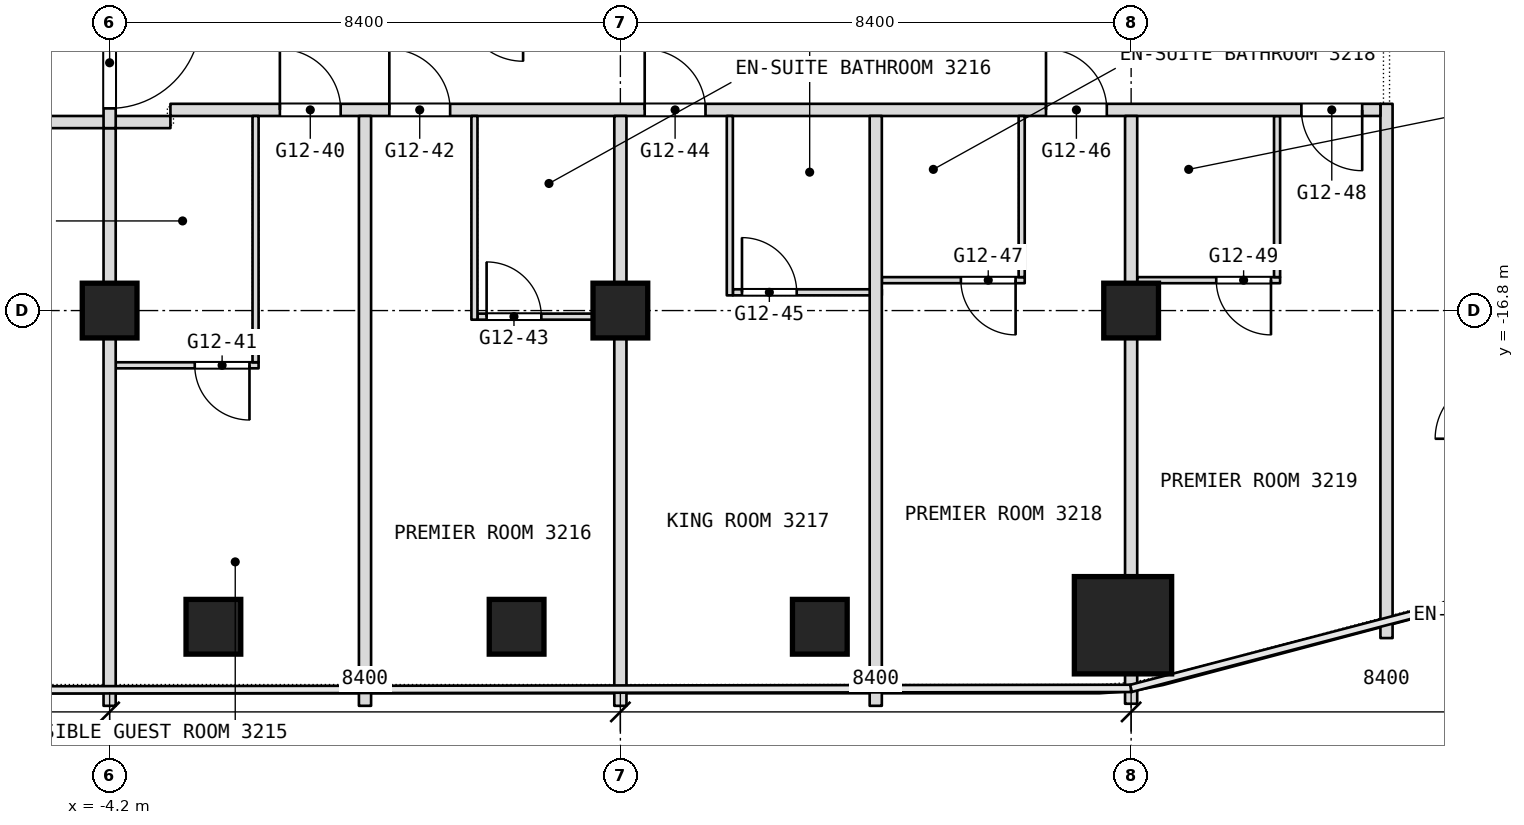
"""IFC4 building model, lengths in metres.
Left out: names, types, materials, properties, quantities, classifications, styles, units other than length and angle.
Written with IfcOpenShell. Run it as: python <this file> out.ifc"""

import sys

from ifc_helpers import new_model, si_unit, direction, frame, frame_2d, origin, origin_2d, place, context, subcontext, project, spatial, rectangle, extrude, element, fill, save


model = new_model("IFC4")
c1 = context("Model", 3, precision=1e-05, world=origin(), true_north=direction((0.0, 1.0)))
c2 = subcontext(c1, "Body", "Model", "MODEL_VIEW")
j1 = project(units=[si_unit("LENGTHUNIT", "METRE"), si_unit("PLANEANGLEUNIT", "RADIAN")], contexts=[c1])
p1 = place(None, origin())
s1 = spatial("IfcSite", under=j1, at=p1, CompositionType="ELEMENT")
p2 = place(p1, origin())
s2 = spatial("IfcBuilding", under=s1, at=p2, CompositionType="ELEMENT")
p3 = place(p2, frame((0.0, 0.0, 140.9)))
s3 = spatial("IfcBuildingStorey", under=s2, at=p3, CompositionType="ELEMENT", Elevation=140.9)
p4 = place(p3, frame((12.466, -21.975, 0.0), z_axis=(0.0, 0.0, 1.0), x_axis=(1.0, 0.0, 0.0)))
e1 = element("IfcColumn", 1, at=p4, inside=s3, PredefinedType="COLUMN", context=c2, shape_type="SweptSolid", body=[
    extrude(rectangle(XDim=1.6, YDim=1.6, at=origin_2d()), origin(), (0.0, 0.0, 1.0), 3.6),
])
for number, where, z_axis, x_axis in (
    (2, (-4.2, -16.8, 0.0), (0.0, 0.0, 1.0), (1.0, 0.0, 0.0)),
    (3, (4.2, -16.8, 0.0), (0.0, 0.0, 1.0), (1.0, 0.0, 0.0)),
    (4, (12.6, -16.8, 0.0), (0.0, 0.0, 1.0), (1.0, 0.0, 0.0)),
    (5, (7.48, -22.0, 0.0), (0.0, 0.0, 1.0), (1.0, 0.0, 0.0)),
    (6, (2.493, -22.0, 0.0), (0.0, 0.0, 1.0), (1.0, 0.0, 0.0)),
    (7, (-2.493, -22.0, 0.0), (0.0, 0.0, 1.0), (1.0, 0.0, 0.0)),
):
    element("IfcColumn", number, at=place(p3, frame(where, z_axis=z_axis, x_axis=x_axis)), inside=s3, PredefinedType="COLUMN", context=c2, shape_type="SweptSolid", body=[
        extrude(rectangle(XDim=0.9, YDim=0.9, at=origin_2d()), origin(), (0.0, 0.0, 1.0), 3.6),
    ])
p5 = place(p3, frame((-4.1, -17.7, 0.0), z_axis=(0.0, 0.0, 1.0), x_axis=(1.0, 0.0, 0.0)))
e8 = element("IfcWall", 8, at=p5, inside=s3, PredefinedType="PARTITIONING", context=c2, shape_type="SweptSolid", body=[
    extrude(rectangle(XDim=2.35, YDim=0.1, at=frame_2d((1.175, 0.0))), origin(), (0.0, 0.0, 1.0), 3.34),
])
p6 = place(p5, frame((1.3, 0.0, 0.0)))
e9 = element("IfcOpeningElement", 9, at=p6, cuts=e8, PredefinedType="OPENING", context=c2, shape_type="SweptSolid", body=[
    extrude(rectangle(XDim=0.9, YDim=2.1, at=frame_2d((0.45, 1.05))), frame((0.0, 0.05, 0.0), z_axis=(0.0, -1.0, 0.0), x_axis=(1.0, 0.0, 0.0)), (0.0, 0.0, 1.0), 0.1),
])
p7 = place(p3, frame((1.85, -16.9, 0.0), z_axis=(0.0, 0.0, 1.0), x_axis=(1.0, 0.0, 0.0)))
e10 = element("IfcWall", 10, at=p7, inside=s3, PredefinedType="PARTITIONING", context=c2, shape_type="SweptSolid", body=[
    extrude(rectangle(XDim=2.45, YDim=0.1, at=frame_2d((1.225, 0.0))), origin(), (0.0, 0.0, 1.0), 2.89),
])
p8 = place(p7, frame((0.15, 0.0, 0.0)))
e11 = element("IfcOpeningElement", 11, at=p8, cuts=e10, PredefinedType="OPENING", context=c2, shape_type="SweptSolid", body=[
    extrude(rectangle(XDim=0.9, YDim=2.1, at=frame_2d((0.45, 1.05))), frame((0.0, 0.05, 0.0), z_axis=(0.0, -1.0, 0.0), x_axis=(1.0, 0.0, 0.0)), (0.0, 0.0, 1.0), 0.1),
])
p9 = place(p3, frame((16.8, -22.186, 0.0), z_axis=(0.0, 0.0, 1.0), x_axis=(0.0, 1.0, 0.0)))
e12 = element("IfcWall", 12, at=p9, inside=s3, PredefinedType="PARTITIONING", context=c2, shape_type="SweptSolid", body=[
    extrude(rectangle(XDim=8.786, YDim=0.2, at=frame_2d((4.393, 0.0))), origin(), (0.0, 0.0, 1.0), 3.34),
])
p10 = place(p3, frame((6.05, -16.5, 0.0), z_axis=(0.0, 0.0, 1.0), x_axis=(1.0, 0.0, 0.0)))
e13 = element("IfcWall", 13, at=p10, inside=s3, PredefinedType="PARTITIONING", context=c2, shape_type="SweptSolid", body=[
    extrude(rectangle(XDim=2.45, YDim=0.1, at=frame_2d((1.225, 0.0))), origin(), (0.0, 0.0, 1.0), 3.34),
])
p11 = place(p10, frame((0.15, 0.0, 0.0)))
e14 = element("IfcOpeningElement", 14, at=p11, cuts=e13, PredefinedType="OPENING", context=c2, shape_type="SweptSolid", body=[
    extrude(rectangle(XDim=0.9, YDim=2.1, at=frame_2d((0.45, 1.05))), frame((0.0, 0.05, 0.0), z_axis=(0.0, -1.0, 0.0), x_axis=(1.0, 0.0, 0.0)), (0.0, 0.0, 1.0), 0.1),
])
p12 = place(p3, frame((8.5, -16.3, 0.0), z_axis=(0.0, 0.0, 1.0), x_axis=(1.0, 0.0, 0.0)))
e15 = element("IfcWall", 15, at=p12, inside=s3, PredefinedType="PARTITIONING", context=c2, shape_type="SweptSolid", body=[
    extrude(rectangle(XDim=2.35, YDim=0.1, at=frame_2d((1.175, 0.0))), origin(), (0.0, 0.0, 1.0), 3.34),
])
p13 = place(p12, frame((1.3, 0.0, 0.0)))
e16 = element("IfcOpeningElement", 16, at=p13, cuts=e15, PredefinedType="OPENING", context=c2, shape_type="SweptSolid", body=[
    extrude(rectangle(XDim=0.9, YDim=2.1, at=frame_2d((0.45, 1.05))), frame((0.0, 0.05, 0.0), z_axis=(0.0, -1.0, 0.0), x_axis=(1.0, 0.0, 0.0)), (0.0, 0.0, 1.0), 0.1),
])
p14 = place(p3, frame((12.7, -16.3, 0.0), z_axis=(0.0, 0.0, 1.0), x_axis=(1.0, 0.0, 0.0)))
e17 = element("IfcWall", 17, at=p14, inside=s3, PredefinedType="PARTITIONING", context=c2, shape_type="SweptSolid", body=[
    extrude(rectangle(XDim=2.35, YDim=0.1, at=frame_2d((1.175, 0.0))), origin(), (0.0, 0.0, 1.0), 3.34),
])
p15 = place(p14, frame((1.3, 0.0, 0.0)))
e18 = element("IfcOpeningElement", 18, at=p15, cuts=e17, PredefinedType="OPENING", context=c2, shape_type="SweptSolid", body=[
    extrude(rectangle(XDim=0.9, YDim=2.1, at=frame_2d((0.45, 1.05))), frame((0.0, 0.05, 0.0), z_axis=(0.0, -1.0, 0.0), x_axis=(1.0, 0.0, 0.0)), (0.0, 0.0, 1.0), 0.1),
])
p16 = place(p3, frame((15.0, -16.25, 0.0), z_axis=(0.0, 0.0, 1.0), x_axis=(0.0, 1.0, 0.0)))
e19 = element("IfcWall", 19, at=p16, inside=s3, PredefinedType="PARTITIONING", context=c2, shape_type="SweptSolid", body=[
    extrude(rectangle(XDim=2.65, YDim=0.1, at=frame_2d((1.325, 0.0))), origin(), (0.0, 0.0, 1.0), 3.34),
])
p17 = place(p3, frame((-12.4, -13.7, 0.0), z_axis=(0.0, 0.0, 1.0), x_axis=(1.0, 0.0, 0.0)))
e20 = element("IfcWall", 20, at=p17, inside=s3, PredefinedType="PARTITIONING", context=c2, shape_type="SweptSolid", body=[
    extrude(rectangle(XDim=9.2, YDim=0.2, at=frame_2d((4.6, 0.0))), origin(), (0.0, 0.0, 1.0), 3.34),
])
p18 = place(p17, frame((3.1, 0.0, 0.0)))
e21 = element("IfcOpeningElement", 21, at=p18, cuts=e20, PredefinedType="OPENING", context=c2, shape_type="SweptSolid", body=[
    extrude(rectangle(XDim=1.8, YDim=2.1, at=frame_2d((0.9, 1.05))), frame((0.0, 0.1, 0.0), z_axis=(0.0, -1.0, 0.0), x_axis=(1.0, 0.0, 0.0)), (0.0, 0.0, 1.0), 0.2),
])
p19 = place(p3, frame((-3.2, -13.5, 0.0), z_axis=(0.0, 0.0, 1.0), x_axis=(1.0, 0.0, 0.0)))
e22 = element("IfcWall", 22, at=p19, inside=s3, PredefinedType="PARTITIONING", context=c2, shape_type="SweptSolid", body=[
    extrude(rectangle(XDim=19.9, YDim=0.2, at=frame_2d((9.95, 0.0))), origin(), (0.0, 0.0, 1.0), 3.34),
])
p20 = place(p19, frame((1.8, 0.0, 0.0)))
e23 = element("IfcOpeningElement", 23, at=p20, cuts=e22, PredefinedType="OPENING", context=c2, shape_type="SweptSolid", body=[
    extrude(rectangle(XDim=1.0, YDim=2.1, at=frame_2d((0.5, 1.05))), frame((0.0, 0.1, 0.0), z_axis=(0.0, -1.0, 0.0), x_axis=(1.0, 0.0, 0.0)), (0.0, 0.0, 1.0), 0.2),
])
p21 = place(p19, frame((3.6, 0.0, 0.0)))
e24 = element("IfcOpeningElement", 24, at=p21, cuts=e22, PredefinedType="OPENING", context=c2, shape_type="SweptSolid", body=[
    extrude(rectangle(XDim=1.0, YDim=2.1, at=frame_2d((0.5, 1.05))), frame((0.0, 0.1, 0.0), z_axis=(0.0, -1.0, 0.0), x_axis=(1.0, 0.0, 0.0)), (0.0, 0.0, 1.0), 0.2),
])
p22 = place(p19, frame((7.8, 0.0, 0.0)))
e25 = element("IfcOpeningElement", 25, at=p22, cuts=e22, PredefinedType="OPENING", context=c2, shape_type="SweptSolid", body=[
    extrude(rectangle(XDim=1.0, YDim=2.1, at=frame_2d((0.5, 1.05))), frame((0.0, 0.1, 0.0), z_axis=(0.0, -1.0, 0.0), x_axis=(1.0, 0.0, 0.0)), (0.0, 0.0, 1.0), 0.2),
])
p23 = place(p19, frame((14.4, 0.0, 0.0)))
e26 = element("IfcOpeningElement", 26, at=p23, cuts=e22, PredefinedType="OPENING", context=c2, shape_type="SweptSolid", body=[
    extrude(rectangle(XDim=1.0, YDim=2.1, at=frame_2d((0.5, 1.05))), frame((0.0, 0.1, 0.0), z_axis=(0.0, -1.0, 0.0), x_axis=(1.0, 0.0, 0.0)), (0.0, 0.0, 1.0), 0.2),
])
p24 = place(p19, frame((18.6, 0.0, 0.0)))
e27 = element("IfcOpeningElement", 27, at=p24, cuts=e22, PredefinedType="OPENING", context=c2, shape_type="SweptSolid", body=[
    extrude(rectangle(XDim=1.0, YDim=2.1, at=frame_2d((0.5, 1.05))), frame((0.0, 0.1, 0.0), z_axis=(0.0, -1.0, 0.0), x_axis=(1.0, 0.0, 0.0)), (0.0, 0.0, 1.0), 0.2),
])
p25 = place(p3, frame((12.6, -23.266, 0.0), z_axis=(0.0, 0.0, 1.0), x_axis=(0.0, 1.0, 0.0)))
e28 = element("IfcWall", 28, at=p25, inside=s3, PredefinedType="PARTITIONING", context=c2, shape_type="SweptSolid", body=[
    extrude(rectangle(XDim=0.491, YDim=0.2, at=frame_2d((0.246, 0.0))), origin(), (0.0, 0.0, 1.0), 3.34),
])
p26 = place(p3, frame((12.6, -21.175, 0.0), z_axis=(0.0, 0.0, 1.0), x_axis=(0.0, 1.0, 0.0)))
e29 = element("IfcWall", 29, at=p26, inside=s3, PredefinedType="PARTITIONING", context=c2, shape_type="SweptSolid", body=[
    extrude(rectangle(XDim=7.575, YDim=0.2, at=frame_2d((3.788, 0.0))), origin(), (0.0, 0.0, 1.0), 3.34),
])
p27 = place(p3, frame((10.8, -16.25, 0.0), z_axis=(0.0, 0.0, 1.0), x_axis=(0.0, 1.0, 0.0)))
e30 = element("IfcWall", 30, at=p27, inside=s3, PredefinedType="PARTITIONING", context=c2, shape_type="SweptSolid", body=[
    extrude(rectangle(XDim=2.65, YDim=0.1, at=frame_2d((1.325, 0.0))), origin(), (0.0, 0.0, 1.0), 3.34),
])
p28 = place(p3, frame((8.4, -23.3, 0.0), z_axis=(0.0, 0.0, 1.0), x_axis=(0.0, 1.0, 0.0)))
e31 = element("IfcWall", 31, at=p28, inside=s3, PredefinedType="PARTITIONING", context=c2, shape_type="SweptSolid", body=[
    extrude(rectangle(XDim=9.7, YDim=0.2, at=frame_2d((4.85, 0.0))), origin(), (0.0, 0.0, 1.0), 3.34),
])
p29 = place(p3, frame((6.0, -16.55, 0.0), z_axis=(0.0, 0.0, 1.0), x_axis=(0.0, 1.0, 0.0)))
e32 = element("IfcWall", 32, at=p29, inside=s3, PredefinedType="PARTITIONING", context=c2, shape_type="SweptSolid", body=[
    extrude(rectangle(XDim=2.95, YDim=0.1, at=frame_2d((1.475, 0.0))), origin(), (0.0, 0.0, 1.0), 3.34),
])
p30 = place(p3, frame((4.2, -23.3, 0.0), z_axis=(0.0, 0.0, 1.0), x_axis=(0.0, 1.0, 0.0)))
e33 = element("IfcWall", 33, at=p30, inside=s3, PredefinedType="PARTITIONING", context=c2, shape_type="SweptSolid", body=[
    extrude(rectangle(XDim=9.7, YDim=0.2, at=frame_2d((4.85, 0.0))), origin(), (0.0, 0.0, 1.0), 3.34),
])
p31 = place(p3, frame((1.8, -16.95, 0.0), z_axis=(0.0, 0.0, 1.0), x_axis=(0.0, 1.0, 0.0)))
e34 = element("IfcWall", 34, at=p31, inside=s3, PredefinedType="PARTITIONING", context=c2, shape_type="SweptSolid", body=[
    extrude(rectangle(XDim=3.35, YDim=0.1, at=frame_2d((1.675, 0.0))), origin(), (0.0, 0.0, 1.0), 3.34),
])
p32 = place(p3, frame((0.0, -23.3, 0.0), z_axis=(0.0, 0.0, 1.0), x_axis=(0.0, 1.0, 0.0)))
e35 = element("IfcWall", 35, at=p32, inside=s3, PredefinedType="PARTITIONING", context=c2, shape_type="SweptSolid", body=[
    extrude(rectangle(XDim=9.7, YDim=0.2, at=frame_2d((4.85, 0.0))), origin(), (0.0, 0.0, 1.0), 3.34),
])
p33 = place(p3, frame((-1.8, -17.65, 0.0), z_axis=(0.0, 0.0, 1.0), x_axis=(0.0, 1.0, 0.0)))
e36 = element("IfcWall", 36, at=p33, inside=s3, PredefinedType="PARTITIONING", context=c2, shape_type="SweptSolid", body=[
    extrude(rectangle(XDim=4.05, YDim=0.1, at=frame_2d((2.025, 0.0))), origin(), (0.0, 0.0, 1.0), 3.34),
])
p34 = place(p3, frame((-4.2, -23.3, 0.0), z_axis=(0.0, 0.0, 1.0), x_axis=(0.0, 1.0, 0.0)))
e37 = element("IfcWall", 37, at=p34, inside=s3, PredefinedType="PARTITIONING", context=c2, shape_type="SweptSolid", body=[
    extrude(rectangle(XDim=9.5, YDim=0.2, at=frame_2d((4.75, 0.0))), origin(), (0.0, 0.0, 1.0), 3.34),
])
p35 = place(p3, frame((-4.2, -13.8, 0.0), z_axis=(0.0, 0.0, 1.0), x_axis=(0.0, 1.0, 0.0)))
e38 = element("IfcWall", 38, at=p35, inside=s3, PredefinedType="PARTITIONING", context=c2, shape_type="SweptSolid", body=[
    extrude(rectangle(XDim=13.8, YDim=0.2, at=frame_2d((6.9, 0.0))), origin(), (0.0, 0.0, 1.0), 3.34),
])
p36 = place(p35, frame((12.15, 0.0, 0.0)))
e39 = element("IfcOpeningElement", 39, at=p36, cuts=e38, PredefinedType="OPENING", context=c2, shape_type="SweptSolid", body=[
    extrude(rectangle(XDim=1.5, YDim=2.1, at=frame_2d((0.75, 1.05))), frame((0.0, 0.1, 0.0), z_axis=(0.0, -1.0, 0.0), x_axis=(1.0, 0.0, 0.0)), (0.0, 0.0, 1.0), 0.2),
])
p37 = place(p35, frame((0.325, 0.0, 0.0)))
e40 = element("IfcOpeningElement", 40, at=p37, cuts=e38, PredefinedType="OPENING", context=c2, shape_type="SweptSolid", body=[
    extrude(rectangle(XDim=1.5, YDim=2.1, at=frame_2d((0.75, 1.05))), frame((0.0, 0.1, 0.0), z_axis=(0.0, -1.0, 0.0), x_axis=(1.0, 0.0, 0.0)), (0.0, 0.0, 1.0), 0.2),
])
p38 = place(p6, origin())
e41 = element("IfcDoor", 41, at=p38, inside=s3, OperationType="SINGLE_SWING_RIGHT", PredefinedType="DOOR", context=c2, shape_type="SweptSolid", body=[
    extrude(rectangle(XDim=0.9, YDim=2.1, at=frame_2d((0.45, 1.05))), frame((0.0, 0.025, 0.0), z_axis=(0.0, -1.0, 0.0), x_axis=(1.0, 0.0, 0.0)), (0.0, 0.0, 1.0), 0.05),
])
fill(e9, e41)
p39 = place(p8, origin())
e42 = element("IfcDoor", 42, at=p39, inside=s3, OperationType="SINGLE_SWING_LEFT", PredefinedType="DOOR", context=c2, shape_type="SweptSolid", body=[
    extrude(rectangle(XDim=0.9, YDim=2.1, at=frame_2d((0.45, 1.05))), frame((0.0, 0.025, 0.0), z_axis=(0.0, -1.0, 0.0), x_axis=(1.0, 0.0, 0.0)), (0.0, 0.0, 1.0), 0.05),
])
fill(e11, e42)
p40 = place(p11, origin())
e43 = element("IfcDoor", 43, at=p40, inside=s3, OperationType="SINGLE_SWING_LEFT", PredefinedType="DOOR", context=c2, shape_type="SweptSolid", body=[
    extrude(rectangle(XDim=0.9, YDim=2.1, at=frame_2d((0.45, 1.05))), frame((0.0, 0.025, 0.0), z_axis=(0.0, -1.0, 0.0), x_axis=(1.0, 0.0, 0.0)), (0.0, 0.0, 1.0), 0.05),
])
fill(e14, e43)
p41 = place(p13, origin())
e44 = element("IfcDoor", 44, at=p41, inside=s3, OperationType="SINGLE_SWING_RIGHT", PredefinedType="DOOR", context=c2, shape_type="SweptSolid", body=[
    extrude(rectangle(XDim=0.9, YDim=2.1, at=frame_2d((0.45, 1.05))), frame((0.0, 0.025, 0.0), z_axis=(0.0, -1.0, 0.0), x_axis=(1.0, 0.0, 0.0)), (0.0, 0.0, 1.0), 0.05),
])
fill(e16, e44)
p42 = place(p15, origin())
e45 = element("IfcDoor", 45, at=p42, inside=s3, OperationType="SINGLE_SWING_RIGHT", PredefinedType="DOOR", context=c2, shape_type="SweptSolid", body=[
    extrude(rectangle(XDim=0.9, YDim=2.1, at=frame_2d((0.45, 1.05))), frame((0.0, 0.025, 0.0), z_axis=(0.0, -1.0, 0.0), x_axis=(1.0, 0.0, 0.0)), (0.0, 0.0, 1.0), 0.05),
])
fill(e18, e45)
p43 = place(p20, origin())
e46 = element("IfcDoor", 46, at=p43, inside=s3, OperationType="SINGLE_SWING_RIGHT", PredefinedType="DOOR", context=c2, shape_type="SweptSolid", body=[
    extrude(rectangle(XDim=1.0, YDim=2.1, at=frame_2d((0.5, 1.05))), frame((0.0, 0.025, 0.0), z_axis=(0.0, -1.0, 0.0), x_axis=(1.0, 0.0, 0.0)), (0.0, 0.0, 1.0), 0.05),
])
fill(e23, e46)
p44 = place(p21, origin())
e47 = element("IfcDoor", 47, at=p44, inside=s3, OperationType="SINGLE_SWING_RIGHT", PredefinedType="DOOR", context=c2, shape_type="SweptSolid", body=[
    extrude(rectangle(XDim=1.0, YDim=2.1, at=frame_2d((0.5, 1.05))), frame((0.0, 0.025, 0.0), z_axis=(0.0, -1.0, 0.0), x_axis=(1.0, 0.0, 0.0)), (0.0, 0.0, 1.0), 0.05),
])
fill(e24, e47)
p45 = place(p22, origin())
e48 = element("IfcDoor", 48, at=p45, inside=s3, OperationType="SINGLE_SWING_RIGHT", PredefinedType="DOOR", context=c2, shape_type="SweptSolid", body=[
    extrude(rectangle(XDim=1.0, YDim=2.1, at=frame_2d((0.5, 1.05))), frame((0.0, 0.025, 0.0), z_axis=(0.0, -1.0, 0.0), x_axis=(1.0, 0.0, 0.0)), (0.0, 0.0, 1.0), 0.05),
])
fill(e25, e48)
p46 = place(p23, origin())
e49 = element("IfcDoor", 49, at=p46, inside=s3, OperationType="SINGLE_SWING_RIGHT", PredefinedType="DOOR", context=c2, shape_type="SweptSolid", body=[
    extrude(rectangle(XDim=1.0, YDim=2.1, at=frame_2d((0.5, 1.05))), frame((0.0, 0.025, 0.0), z_axis=(0.0, -1.0, 0.0), x_axis=(1.0, 0.0, 0.0)), (0.0, 0.0, 1.0), 0.05),
])
fill(e26, e49)
p47 = place(p24, origin())
e50 = element("IfcDoor", 50, at=p47, inside=s3, OperationType="SINGLE_SWING_LEFT", PredefinedType="DOOR", context=c2, shape_type="SweptSolid", body=[
    extrude(rectangle(XDim=1.0, YDim=2.1, at=frame_2d((0.5, 1.05))), frame((0.0, 0.025, 0.0), z_axis=(0.0, -1.0, 0.0), x_axis=(1.0, 0.0, 0.0)), (0.0, 0.0, 1.0), 0.05),
])
fill(e27, e50)
p48 = place(p37, origin())
e51 = element("IfcDoor", 51, at=p48, inside=s3, OperationType="DOUBLE_DOOR_DOUBLE_SWING", PredefinedType="DOOR", context=c2, shape_type="SweptSolid", body=[
    extrude(rectangle(XDim=1.5, YDim=2.1, at=frame_2d((0.75, 1.05))), frame((0.0, 0.025, 0.0), z_axis=(0.0, -1.0, 0.0), x_axis=(1.0, 0.0, 0.0)), (0.0, 0.0, 1.0), 0.05),
])
fill(e40, e51)
save(model, sys.argv[1])
